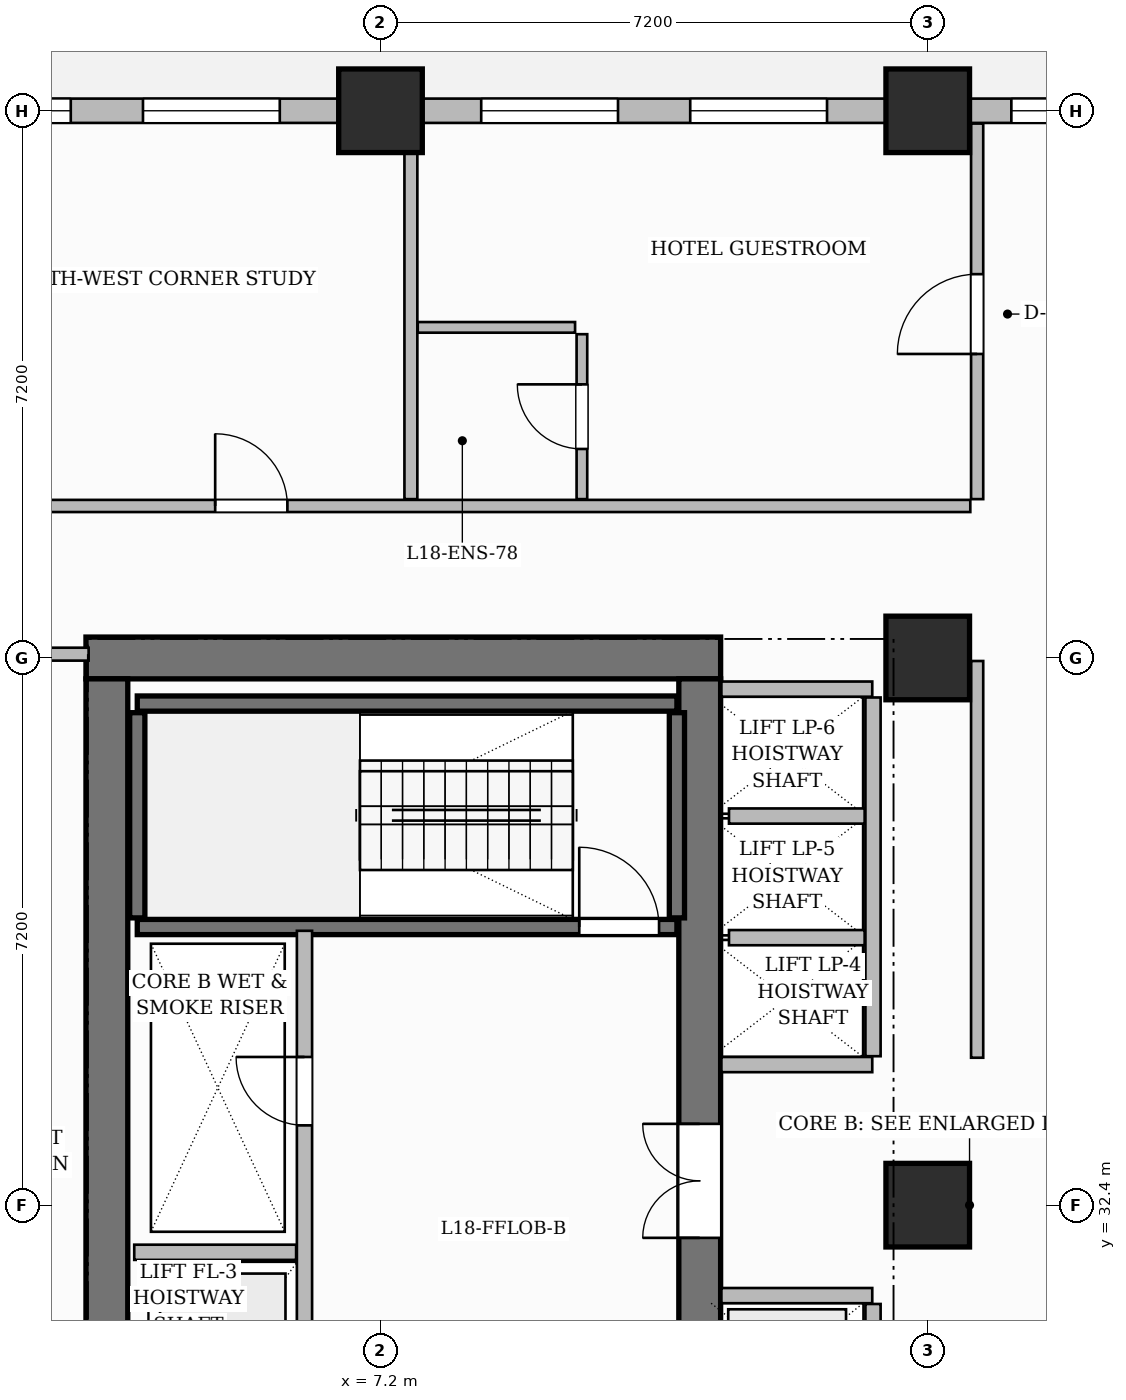
"""IFC4 building model, lengths in metres.
Left out: names, types, materials, properties, quantities, classifications, styles, units other than length and angle.
Written with IfcOpenShell. Run it as: python <this file> out.ifc"""

import sys

from ifc_helpers import new_model, si_unit, direction, frame, frame_2d, origin, origin_2d, place, context, subcontext, project, spatial, rectangle, extrude, source, transform, mapped, element, fill, save


model = new_model("IFC4")
c1 = context("Model", 3, precision=1e-05, world=origin(), true_north=direction((0.0, 1.0)))
c2 = subcontext(c1, "Body", "Model", "MODEL_VIEW")
j1 = project(units=[si_unit("LENGTHUNIT", "METRE"), si_unit("PLANEANGLEUNIT", "RADIAN")], contexts=[c1])
p1 = place(None, origin())
s1 = spatial("IfcSite", under=j1, at=p1, CompositionType="ELEMENT")
p2 = place(p1, origin())
s2 = spatial("IfcBuilding", under=s1, at=p2, CompositionType="ELEMENT")
p3 = place(p2, frame((0.0, 0.0, 76.8)))
s3 = spatial("IfcBuildingStorey", under=s2, at=p3, CompositionType="ELEMENT", Elevation=76.8)
p4 = place(p3, frame((3.325, 39.6, 0.0), z_axis=(0.0, 0.0, 1.0), x_axis=(1.0, 0.0, 0.0)))
e1 = element("IfcWall", 1, at=p4, inside=s3, PredefinedType="SHEAR", context=c2, shape_type="SweptSolid", body=[
    extrude(rectangle(XDim=8.35, YDim=0.55, at=frame_2d((4.175, 0.0))), origin(), (0.0, 0.0, 1.0), 3.7),
])
p5 = place(p3, frame((3.6, 25.475, 0.0), z_axis=(0.0, 0.0, 1.0), x_axis=(0.0, 1.0, 0.0)))
e2 = element("IfcWall", 2, at=p5, inside=s3, PredefinedType="SHEAR", context=c2, shape_type="SweptSolid", body=[
    extrude(rectangle(XDim=13.85, YDim=0.55, at=frame_2d((6.925, 0.0))), origin(), (0.0, 0.0, 1.0), 3.7),
])
p6 = place(p3, frame((11.4, 25.475, 0.0), z_axis=(0.0, 0.0, 1.0), x_axis=(0.0, 1.0, 0.0)))
e3 = element("IfcWall", 3, at=p6, inside=s3, PredefinedType="SHEAR", context=c2, shape_type="SweptSolid", body=[
    extrude(rectangle(XDim=13.85, YDim=0.55, at=frame_2d((6.925, 0.0))), origin(), (0.0, 0.0, 1.0), 3.7),
])
p7 = place(p6, frame((6.495, 0.0, 0.0)))
e4 = element("IfcOpeningElement", 4, at=p7, cuts=e3, PredefinedType="OPENING", context=c2, shape_type="SweptSolid", body=[
    extrude(rectangle(XDim=1.5, YDim=2.2, at=frame_2d((0.75, 1.1))), frame((0.0, 0.285, 0.0), z_axis=(0.0, -1.0, 0.0), x_axis=(1.0, 0.0, 0.0)), (0.0, 0.0, 1.0), 0.57),
])
m1 = source(origin(), c2, "Body", "SweptSolid", [
    extrude(rectangle(XDim=1.1, YDim=1.1, at=origin_2d()), origin(), (0.0, 0.0, 1.0), 3.7),
])
for number, where, z_axis, x_axis in (
    (5, (7.2, 46.8, 0.0), (0.0, 0.0, 1.0), (1.0, 0.0, 0.0)),
    (6, (14.4, 32.4, 0.0), (0.0, 0.0, 1.0), (1.0, 0.0, 0.0)),
    (7, (14.4, 39.6, 0.0), (0.0, 0.0, 1.0), (1.0, 0.0, 0.0)),
    (8, (14.4, 46.8, 0.0), (0.0, 0.0, 1.0), (1.0, 0.0, 0.0)),
):
    element("IfcColumn", number, at=place(p3, frame(where, z_axis=z_axis, x_axis=x_axis)), inside=s3, PredefinedType="COLUMN", context=c2, shape_type="MappedRepresentation", body=[
        mapped(m1, transform((0.0, 0.0, 0.0), scale=1.0)),
    ])
p8 = place(p3, frame((4.0, 39.0, 0.0), z_axis=(0.0, 0.0, 1.0), x_axis=(1.0, 0.0, 0.0)))
e9 = element("IfcWall", 9, at=p8, inside=s3, PredefinedType="SHEAR", context=c2, shape_type="SweptSolid", body=[
    extrude(rectangle(XDim=7.1, YDim=0.2, at=frame_2d((3.55, 0.0))), origin(), (0.0, 0.0, 1.0), 3.7),
])
for number, where, z_axis, x_axis in (
    (10, (4.0, 36.18, 0.0), (0.0, 0.0, 1.0), (0.0, 1.0, 0.0)),
    (11, (11.1, 36.18, 0.0), (0.0, 0.0, 1.0), (0.0, 1.0, 0.0)),
):
    element("IfcWall", number, at=place(p3, frame(where, z_axis=z_axis, x_axis=x_axis)), inside=s3, PredefinedType="SHEAR", context=c2, shape_type="SweptSolid", body=[
        extrude(rectangle(XDim=2.7, YDim=0.2, at=frame_2d((1.35, 0.0))), origin(), (0.0, 0.0, 1.0), 3.7),
    ])
p9 = place(p3, frame((4.0, 36.06, 0.0), z_axis=(0.0, 0.0, 1.0), x_axis=(1.0, 0.0, 0.0)))
e12 = element("IfcWall", 12, at=p9, inside=s3, PredefinedType="SHEAR", context=c2, shape_type="SweptSolid", body=[
    extrude(rectangle(XDim=7.1, YDim=0.2, at=frame_2d((3.55, 0.0))), origin(), (0.0, 0.0, 1.0), 3.7),
])
p10 = place(p9, frame((5.815, 0.0, 0.0)))
e13 = element("IfcOpeningElement", 13, at=p10, cuts=e12, PredefinedType="OPENING", context=c2, shape_type="SweptSolid", body=[
    extrude(rectangle(XDim=1.05, YDim=2.2, at=frame_2d((0.525, 1.1))), frame((0.0, 0.11, 0.0), z_axis=(0.0, -1.0, 0.0), x_axis=(1.0, 0.0, 0.0)), (0.0, 0.0, 1.0), 0.22),
])
p11 = place(p3, frame((6.2, 28.79, 0.0), z_axis=(0.0, 0.0, 1.0), x_axis=(0.0, 1.0, 0.0)))
e14 = element("IfcWall", 14, at=p11, inside=s3, PredefinedType="PARTITIONING", context=c2, shape_type="SweptSolid", body=[
    extrude(rectangle(XDim=7.22, YDim=0.2, at=frame_2d((3.61, 0.0))), origin(), (0.0, 0.0, 1.0), 3.45),
])
p12 = place(p11, frame((4.66, 0.0, 0.0)))
e15 = element("IfcOpeningElement", 15, at=p12, cuts=e14, PredefinedType="OPENING", context=c2, shape_type="SweptSolid", body=[
    extrude(rectangle(XDim=0.9, YDim=2.1, at=frame_2d((0.45, 1.05))), frame((0.0, 0.11, 0.0), z_axis=(0.0, -1.0, 0.0), x_axis=(1.0, 0.0, 0.0)), (0.0, 0.0, 1.0), 0.22),
])
p13 = place(p11, frame((0.96, 0.0, 0.0)))
e16 = element("IfcOpeningElement", 16, at=p13, cuts=e14, PredefinedType="OPENING", context=c2, shape_type="SweptSolid", body=[
    extrude(rectangle(XDim=1.1, YDim=2.2, at=frame_2d((0.55, 1.1))), frame((0.0, 0.11, 0.0), z_axis=(0.0, -1.0, 0.0), x_axis=(1.0, 0.0, 0.0)), (0.0, 0.0, 1.0), 0.22),
])
p14 = place(p3, frame((3.96, 31.78, 0.0), z_axis=(0.0, 0.0, 1.0), x_axis=(1.0, 0.0, 0.0)))
e17 = element("IfcWall", 17, at=p14, inside=s3, PredefinedType="PARTITIONING", context=c2, shape_type="SweptSolid", body=[
    extrude(rectangle(XDim=2.13, YDim=0.2, at=frame_2d((1.065, 0.0))), origin(), (0.0, 0.0, 1.0), 3.45),
])
p15 = place(p3, frame((11.685, 31.21, 0.0), z_axis=(0.0, 0.0, 1.0), x_axis=(1.0, 0.0, 0.0)))
e18 = element("IfcWall", 18, at=p15, inside=s3, PredefinedType="PARTITIONING", context=c2, shape_type="SweptSolid", body=[
    extrude(rectangle(XDim=1.985, YDim=0.2, at=frame_2d((0.992, 0.0))), origin(), (0.0, 0.0, 1.0), 3.45),
])
p16 = place(p3, frame((13.68, 26.16, 0.0), z_axis=(0.0, 0.0, 1.0), x_axis=(0.0, 1.0, 0.0)))
e19 = element("IfcWall", 19, at=p16, inside=s3, PredefinedType="PARTITIONING", context=c2, shape_type="SweptSolid", body=[
    extrude(rectangle(XDim=4.94, YDim=0.2, at=frame_2d((2.47, 0.0))), origin(), (0.0, 0.0, 1.0), 3.45),
])
p17 = place(p16, frame((0.24, 0.0, 0.0)))
e20 = element("IfcOpeningElement", 20, at=p17, cuts=e19, PredefinedType="OPENING", context=c2, shape_type="SweptSolid", body=[
    extrude(rectangle(XDim=1.1, YDim=2.2, at=frame_2d((0.55, 1.1))), frame((0.0, 0.11, 0.0), z_axis=(0.0, -1.0, 0.0), x_axis=(1.0, 0.0, 0.0)), (0.0, 0.0, 1.0), 0.22),
])
p18 = place(p16, frame((1.92, 0.0, 0.0)))
e21 = element("IfcOpeningElement", 21, at=p18, cuts=e19, PredefinedType="OPENING", context=c2, shape_type="SweptSolid", body=[
    extrude(rectangle(XDim=1.1, YDim=2.2, at=frame_2d((0.55, 1.1))), frame((0.0, 0.11, 0.0), z_axis=(0.0, -1.0, 0.0), x_axis=(1.0, 0.0, 0.0)), (0.0, 0.0, 1.0), 0.22),
])
p19 = place(p16, frame((3.6, 0.0, 0.0)))
e22 = element("IfcOpeningElement", 22, at=p19, cuts=e19, PredefinedType="OPENING", context=c2, shape_type="SweptSolid", body=[
    extrude(rectangle(XDim=1.1, YDim=2.2, at=frame_2d((0.55, 1.1))), frame((0.0, 0.11, 0.0), z_axis=(0.0, -1.0, 0.0), x_axis=(1.0, 0.0, 0.0)), (0.0, 0.0, 1.0), 0.22),
])
for number, where, z_axis, x_axis in (
    (23, (11.685, 34.25, 0.0), (0.0, 0.0, 1.0), (1.0, 0.0, 0.0)),
    (24, (11.685, 39.19, 0.0), (0.0, 0.0, 1.0), (1.0, 0.0, 0.0)),
):
    element("IfcWall", number, at=place(p3, frame(where, z_axis=z_axis, x_axis=x_axis)), inside=s3, PredefinedType="PARTITIONING", context=c2, shape_type="SweptSolid", body=[
        extrude(rectangle(XDim=1.985, YDim=0.2, at=frame_2d((0.992, 0.0))), origin(), (0.0, 0.0, 1.0), 3.45),
    ])
p20 = place(p3, frame((13.68, 34.36, 0.0), z_axis=(0.0, 0.0, 1.0), x_axis=(0.0, 1.0, 0.0)))
e25 = element("IfcWall", 25, at=p20, inside=s3, PredefinedType="PARTITIONING", context=c2, shape_type="SweptSolid", body=[
    extrude(rectangle(XDim=4.72, YDim=0.2, at=frame_2d((2.36, 0.0))), origin(), (0.0, 0.0, 1.0), 3.45),
])
for number, where, z_axis, x_axis in (
    (26, (11.785, 35.92, 0.0), (0.0, 0.0, 1.0), (1.0, 0.0, 0.0)),
    (27, (11.785, 37.52, 0.0), (0.0, 0.0, 1.0), (1.0, 0.0, 0.0)),
):
    element("IfcWall", number, at=place(p3, frame(where, z_axis=z_axis, x_axis=x_axis)), inside=s3, PredefinedType="PARTITIONING", context=c2, shape_type="SweptSolid", body=[
        extrude(rectangle(XDim=1.785, YDim=0.2, at=frame_2d((0.893, 0.0))), origin(), (0.0, 0.0, 1.0), 3.45),
    ])
p21 = place(p3, frame((0.24, 39.65, 0.0), z_axis=(0.0, 0.0, 1.0), x_axis=(1.0, 0.0, 0.0)))
e28 = element("IfcWall", 28, at=p21, inside=s3, PredefinedType="PARTITIONING", context=c2, shape_type="SweptSolid", body=[
    extrude(rectangle(XDim=3.12, YDim=0.17, at=frame_2d((1.56, 0.0))), origin(), (0.0, 0.0, 1.0), 3.45),
])
p22 = place(p21, frame((1.11, 0.0, 0.0)))
e29 = element("IfcOpeningElement", 29, at=p22, cuts=e28, PredefinedType="OPENING", context=c2, shape_type="SweptSolid", body=[
    extrude(rectangle(XDim=0.9, YDim=2.15, at=frame_2d((0.45, 1.075))), frame((0.0, 0.095, 0.0), z_axis=(0.0, -1.0, 0.0), x_axis=(1.0, 0.0, 0.0)), (0.0, 0.0, 1.0), 0.19),
])
p23 = place(p3, frame((15.05, 34.34, 0.0), z_axis=(0.0, 0.0, 1.0), x_axis=(0.0, 1.0, 0.0)))
e30 = element("IfcWall", 30, at=p23, inside=s3, PredefinedType="PARTITIONING", context=c2, shape_type="SweptSolid", body=[
    extrude(rectangle(XDim=5.22, YDim=0.16, at=frame_2d((2.61, 0.0))), origin(), (0.0, 0.0, 1.0), 3.45),
])
p24 = place(p3, frame((15.05, 41.69, 0.0), z_axis=(0.0, 0.0, 1.0), x_axis=(0.0, 1.0, 0.0)))
e31 = element("IfcWall", 31, at=p24, inside=s3, PredefinedType="PARTITIONING", context=c2, shape_type="SweptSolid", body=[
    extrude(rectangle(XDim=4.942, YDim=0.16, at=frame_2d((2.471, 0.0))), origin(), (0.0, 0.0, 1.0), 3.45),
])
p25 = place(p24, frame((1.91, 0.0, 0.0)))
e32 = element("IfcOpeningElement", 32, at=p25, cuts=e31, PredefinedType="OPENING", context=c2, shape_type="SweptSolid", body=[
    extrude(rectangle(XDim=1.05, YDim=2.25, at=frame_2d((0.525, 1.125))), frame((0.0, 0.09, 0.0), z_axis=(0.0, -1.0, 0.0), x_axis=(1.0, 0.0, 0.0)), (0.0, 0.0, 1.0), 0.18),
])
p26 = place(p3, frame((7.6, 41.69, 0.0), z_axis=(0.0, 0.0, 1.0), x_axis=(0.0, 1.0, 0.0)))
e33 = element("IfcWall", 33, at=p26, inside=s3, PredefinedType="PARTITIONING", context=c2, shape_type="SweptSolid", body=[
    extrude(rectangle(XDim=4.87, YDim=0.17, at=frame_2d((2.435, 0.0))), origin(), (0.0, 0.0, 1.0), 3.45),
])
p27 = place(p3, frame((0.168, 41.6, 0.0), z_axis=(0.0, 0.0, 1.0), x_axis=(1.0, 0.0, 0.0)))
e34 = element("IfcWall", 34, at=p27, inside=s3, PredefinedType="PARTITIONING", context=c2, shape_type="SweptSolid", body=[
    extrude(rectangle(XDim=14.792, YDim=0.16, at=frame_2d((7.396, 0.0))), origin(), (0.0, 0.0, 1.0), 2.885),
])
p28 = place(p27, frame((4.857, 0.0, 0.0)))
e35 = element("IfcOpeningElement", 35, at=p28, cuts=e34, PredefinedType="OPENING", context=c2, shape_type="SweptSolid", body=[
    extrude(rectangle(XDim=0.95, YDim=2.15, at=frame_2d((0.475, 1.075))), frame((0.0, 0.09, 0.0), z_axis=(0.0, -1.0, 0.0), x_axis=(1.0, 0.0, 0.0)), (0.0, 0.0, 1.0), 0.18),
])
p29 = place(p3, frame((7.69, 43.95, 0.0), z_axis=(0.0, 0.0, 1.0), x_axis=(1.0, 0.0, 0.0)))
e36 = element("IfcWall", 36, at=p29, inside=s3, PredefinedType="PARTITIONING", context=c2, shape_type="SweptSolid", body=[
    extrude(rectangle(XDim=2.07, YDim=0.14, at=frame_2d((1.035, 0.0))), origin(), (0.0, 0.0, 1.0), 2.885),
])
p30 = place(p3, frame((9.85, 41.69, 0.0), z_axis=(0.0, 0.0, 1.0), x_axis=(0.0, 1.0, 0.0)))
e37 = element("IfcWall", 37, at=p30, inside=s3, PredefinedType="PARTITIONING", context=c2, shape_type="SweptSolid", body=[
    extrude(rectangle(XDim=2.17, YDim=0.14, at=frame_2d((1.085, 0.0))), origin(), (0.0, 0.0, 1.0), 3.45),
])
p31 = place(p30, frame((0.66, 0.0, 0.0)))
e38 = element("IfcOpeningElement", 38, at=p31, cuts=e37, PredefinedType="OPENING", context=c2, shape_type="SweptSolid", body=[
    extrude(rectangle(XDim=0.85, YDim=2.1, at=frame_2d((0.425, 1.05))), frame((0.0, 0.08, 0.0), z_axis=(0.0, -1.0, 0.0), x_axis=(1.0, 0.0, 0.0)), (0.0, 0.0, 1.0), 0.16),
])
p32 = place(p3, frame((0.0, 46.8, 0.0), z_axis=(0.0, 0.0, 1.0), x_axis=(1.0, 0.0, 0.0)))
e39 = element("IfcWall", 39, at=p32, inside=s3, PredefinedType="SOLIDWALL", context=c2, shape_type="SweptSolid", body=[
    extrude(rectangle(XDim=18.0, YDim=0.32, at=frame_2d((9.0, 0.0))), origin(), (0.0, 0.0, 1.0), 2.885),
])
p33 = place(p32, frame((1.325, 0.0, 0.8)))
e40 = element("IfcOpeningElement", 40, at=p33, cuts=e39, PredefinedType="OPENING", context=c2, shape_type="SweptSolid", body=[
    extrude(rectangle(XDim=1.8, YDim=1.85, at=frame_2d((0.9, 0.925))), frame((0.0, 0.17, 0.0), z_axis=(0.0, -1.0, 0.0), x_axis=(1.0, 0.0, 0.0)), (0.0, 0.0, 1.0), 0.34),
])
p34 = place(p32, frame((4.075, 0.0, 0.8)))
e41 = element("IfcOpeningElement", 41, at=p34, cuts=e39, PredefinedType="OPENING", context=c2, shape_type="SweptSolid", body=[
    extrude(rectangle(XDim=1.8, YDim=1.85, at=frame_2d((0.9, 0.925))), frame((0.0, 0.17, 0.0), z_axis=(0.0, -1.0, 0.0), x_axis=(1.0, 0.0, 0.0)), (0.0, 0.0, 1.0), 0.34),
])
p35 = place(p32, frame((8.525, 0.0, 0.8)))
e42 = element("IfcOpeningElement", 42, at=p35, cuts=e39, PredefinedType="OPENING", context=c2, shape_type="SweptSolid", body=[
    extrude(rectangle(XDim=1.8, YDim=1.85, at=frame_2d((0.9, 0.925))), frame((0.0, 0.17, 0.0), z_axis=(0.0, -1.0, 0.0), x_axis=(1.0, 0.0, 0.0)), (0.0, 0.0, 1.0), 0.34),
])
p36 = place(p32, frame((11.275, 0.0, 0.8)))
e43 = element("IfcOpeningElement", 43, at=p36, cuts=e39, PredefinedType="OPENING", context=c2, shape_type="SweptSolid", body=[
    extrude(rectangle(XDim=1.8, YDim=1.85, at=frame_2d((0.9, 0.925))), frame((0.0, 0.17, 0.0), z_axis=(0.0, -1.0, 0.0), x_axis=(1.0, 0.0, 0.0)), (0.0, 0.0, 1.0), 0.34),
])
p37 = place(p32, frame((15.5, 0.0, 0.8)))
e44 = element("IfcOpeningElement", 44, at=p37, cuts=e39, PredefinedType="OPENING", context=c2, shape_type="SweptSolid", body=[
    extrude(rectangle(XDim=1.4, YDim=1.85, at=frame_2d((0.7, 0.925))), frame((0.0, 0.17, 0.0), z_axis=(0.0, -1.0, 0.0), x_axis=(1.0, 0.0, 0.0)), (0.0, 0.0, 1.0), 0.34),
])
m2 = source(origin(), c2, "Body", "SweptSolid", [
    extrude(rectangle(XDim=1.05, YDim=2.2, at=frame_2d((0.525, 1.1))), frame((0.0, 0.025, 0.0), z_axis=(0.0, -1.0, 0.0), x_axis=(1.0, 0.0, 0.0)), (0.0, 0.0, 1.0), 0.05),
])
p38 = place(p10, origin())
e45 = element("IfcDoor", 45, at=p38, inside=s3, OperationType="SINGLE_SWING_LEFT", PredefinedType="DOOR", context=c2, shape_type="MappedRepresentation", body=[
    mapped(m2, transform((0.0, 0.0, 0.0), scale=1.0)),
])
fill(e13, e45)
m3 = source(origin(), c2, "Body", "SweptSolid", [
    extrude(rectangle(XDim=0.9, YDim=2.1, at=frame_2d((0.45, 1.05))), frame((0.0, 0.025, 0.0), z_axis=(0.0, -1.0, 0.0), x_axis=(1.0, 0.0, 0.0)), (0.0, 0.0, 1.0), 0.05),
])
p39 = place(p12, origin())
e46 = element("IfcDoor", 46, at=p39, inside=s3, OperationType="SINGLE_SWING_RIGHT", PredefinedType="DOOR", context=c2, shape_type="MappedRepresentation", body=[
    mapped(m3, transform((0.0, 0.0, 0.0), scale=1.0)),
])
fill(e15, e46)
m4 = source(origin(), c2, "Body", "SweptSolid", [
    extrude(rectangle(XDim=1.5, YDim=2.2, at=frame_2d((0.75, 1.1))), frame((0.0, 0.025, 0.0), z_axis=(0.0, -1.0, 0.0), x_axis=(1.0, 0.0, 0.0)), (0.0, 0.0, 1.0), 0.05),
])
p40 = place(p7, origin())
e47 = element("IfcDoor", 47, at=p40, inside=s3, OperationType="DOUBLE_DOOR_SINGLE_SWING", PredefinedType="DOOR", context=c2, shape_type="MappedRepresentation", body=[
    mapped(m4, transform((0.0, 0.0, 0.0), scale=1.0)),
])
fill(e4, e47)
m5 = source(origin(), c2, "Body", "SweptSolid", [
    extrude(rectangle(XDim=0.95, YDim=2.15, at=frame_2d((0.475, 1.075))), frame((0.0, 0.025, 0.0), z_axis=(0.0, -1.0, 0.0), x_axis=(1.0, 0.0, 0.0)), (0.0, 0.0, 1.0), 0.05),
])
p41 = place(p28, origin())
e48 = element("IfcDoor", 48, at=p41, inside=s3, OperationType="SINGLE_SWING_LEFT", PredefinedType="DOOR", context=c2, shape_type="MappedRepresentation", body=[
    mapped(m5, transform((0.0, 0.0, 0.0), scale=1.0)),
])
fill(e35, e48)
m6 = source(origin(), c2, "Body", "SweptSolid", [
    extrude(rectangle(XDim=0.85, YDim=2.1, at=frame_2d((0.425, 1.05))), frame((0.0, 0.025, 0.0), z_axis=(0.0, -1.0, 0.0), x_axis=(1.0, 0.0, 0.0)), (0.0, 0.0, 1.0), 0.05),
])
p42 = place(p31, origin())
e49 = element("IfcDoor", 49, at=p42, inside=s3, OperationType="SINGLE_SWING_RIGHT", PredefinedType="DOOR", context=c2, shape_type="MappedRepresentation", body=[
    mapped(m6, transform((0.0, 0.0, 0.0), scale=1.0)),
])
fill(e38, e49)
m7 = source(origin(), c2, "Body", "SweptSolid", [
    extrude(rectangle(XDim=1.05, YDim=2.25, at=frame_2d((0.525, 1.125))), frame((0.0, 0.025, 0.0), z_axis=(0.0, -1.0, 0.0), x_axis=(1.0, 0.0, 0.0)), (0.0, 0.0, 1.0), 0.05),
])
p43 = place(p25, origin())
e50 = element("IfcDoor", 50, at=p43, inside=s3, OperationType="SINGLE_SWING_LEFT", PredefinedType="DOOR", context=c2, shape_type="MappedRepresentation", body=[
    mapped(m7, transform((0.0, 0.0, 0.0), scale=1.0)),
])
fill(e32, e50)
m8 = source(origin(), c2, "Body", "SweptSolid", [
    extrude(rectangle(XDim=1.8, YDim=1.85, at=frame_2d((0.9, 0.925))), frame((0.0, 0.03, 0.0), z_axis=(0.0, -1.0, 0.0), x_axis=(1.0, 0.0, 0.0)), (0.0, 0.0, 1.0), 0.06),
])
p44 = place(p33, origin())
e51 = element("IfcWindow", 51, at=p44, inside=s3, PartitioningType="DOUBLE_PANEL_VERTICAL", PredefinedType="WINDOW", context=c2, shape_type="MappedRepresentation", body=[
    mapped(m8, transform((0.0, 0.0, 0.0), scale=1.0)),
])
fill(e40, e51)
p45 = place(p34, origin())
e52 = element("IfcWindow", 52, at=p45, inside=s3, PartitioningType="DOUBLE_PANEL_VERTICAL", PredefinedType="WINDOW", context=c2, shape_type="MappedRepresentation", body=[
    mapped(m8, transform((0.0, 0.0, 0.0), scale=1.0)),
])
fill(e41, e52)
p46 = place(p35, origin())
e53 = element("IfcWindow", 53, at=p46, inside=s3, PartitioningType="DOUBLE_PANEL_VERTICAL", PredefinedType="WINDOW", context=c2, shape_type="MappedRepresentation", body=[
    mapped(m8, transform((0.0, 0.0, 0.0), scale=1.0)),
])
fill(e42, e53)
p47 = place(p36, origin())
e54 = element("IfcWindow", 54, at=p47, inside=s3, PartitioningType="DOUBLE_PANEL_VERTICAL", PredefinedType="WINDOW", context=c2, shape_type="MappedRepresentation", body=[
    mapped(m8, transform((0.0, 0.0, 0.0), scale=1.0)),
])
fill(e43, e54)
m9 = source(origin(), c2, "Body", "SweptSolid", [
    extrude(rectangle(XDim=1.4, YDim=1.85, at=frame_2d((0.7, 0.925))), frame((0.0, 0.03, 0.0), z_axis=(0.0, -1.0, 0.0), x_axis=(1.0, 0.0, 0.0)), (0.0, 0.0, 1.0), 0.06),
])
p48 = place(p37, origin())
e55 = element("IfcWindow", 55, at=p48, inside=s3, PartitioningType="SINGLE_PANEL", PredefinedType="WINDOW", context=c2, shape_type="MappedRepresentation", body=[
    mapped(m9, transform((0.0, 0.0, 0.0), scale=1.0)),
])
fill(e44, e55)
save(model, sys.argv[1])
